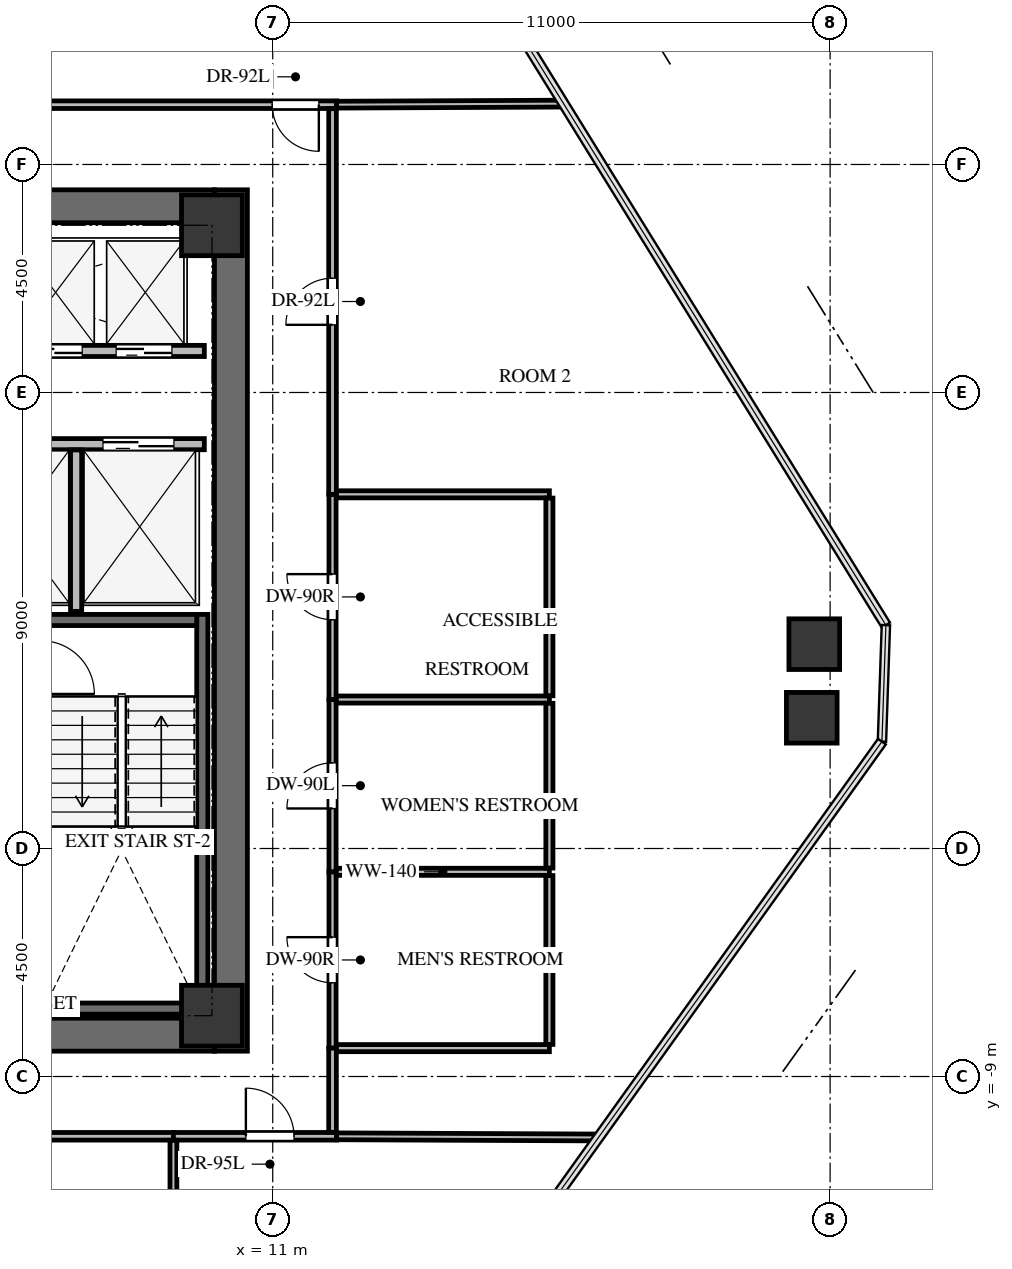
"""IFC4 building model, lengths in metres.
Left out: names, types, materials, properties, quantities, classifications, styles, units other than length and angle.
Written with IfcOpenShell. Run it as: python <this file> out.ifc"""

import sys

from ifc_helpers import new_model, si_unit, direction, frame, frame_2d, origin, origin_2d, place, context, subcontext, project, spatial, rectangle, extrude, source, transform, mapped, element, fill, save


model = new_model("IFC4")
c1 = context("Model", 3, precision=1e-05, world=origin(), true_north=direction((0.0, 1.0)))
c2 = subcontext(c1, "Body", "Model", "MODEL_VIEW")
j1 = project(units=[si_unit("LENGTHUNIT", "METRE"), si_unit("PLANEANGLEUNIT", "RADIAN")], contexts=[c1])
p1 = place(None, origin())
s1 = spatial("IfcSite", under=j1, at=p1, CompositionType="ELEMENT")
p2 = place(p1, origin())
s2 = spatial("IfcBuilding", under=s1, at=p2, CompositionType="ELEMENT")
p3 = place(p2, frame((0.0, 0.0, 193.6)))
s3 = spatial("IfcBuildingStorey", under=s2, at=p3, CompositionType="ELEMENT", Elevation=193.6)
p4 = place(p3, frame((10.175, -8.5, 0.0), z_axis=(0.0, 0.0, 1.0), x_axis=(0.0, 1.0, 0.0)))
e1 = element("IfcWall", 1, at=p4, inside=s3, PredefinedType="SHEAR", context=c2, shape_type="SweptSolid", body=[
    extrude(rectangle(XDim=17.0, YDim=0.65, at=frame_2d((8.5, 0.0))), origin(), (0.0, 0.0, 1.0), 3.3),
])
p5 = place(p3, frame((2.1, -8.175, 0.0), z_axis=(0.0, 0.0, 1.0), x_axis=(1.0, 0.0, 0.0)))
e2 = element("IfcWall", 2, at=p5, inside=s3, PredefinedType="SHEAR", context=c2, shape_type="SweptSolid", body=[
    extrude(rectangle(XDim=7.75, YDim=0.65, at=frame_2d((3.875, 0.0))), origin(), (0.0, 0.0, 1.0), 3.3),
])
p6 = place(p3, frame((-9.85, 8.175, 0.0), z_axis=(0.0, 0.0, 1.0), x_axis=(1.0, 0.0, 0.0)))
e3 = element("IfcWall", 3, at=p6, inside=s3, PredefinedType="SHEAR", context=c2, shape_type="SweptSolid", body=[
    extrude(rectangle(XDim=19.7, YDim=0.65, at=frame_2d((9.85, 0.0))), origin(), (0.0, 0.0, 1.0), 3.3),
])
p7 = place(p3, frame((9.61, -7.77, -0.24), z_axis=(0.0, 0.0, 1.0), x_axis=(0.0, 1.0, 0.0)))
e4 = element("IfcWall", 4, at=p7, inside=s3, PredefinedType="SHEAR", context=c2, shape_type="SweptSolid", body=[
    extrude(rectangle(XDim=7.89, YDim=0.22, at=frame_2d((3.945, 0.0))), origin(), (0.0, 0.0, 1.0), 3.3),
])
for number, where, z_axis, x_axis in (
    (5, (6.54, -7.66, -0.24), (0.0, 0.0, 1.0), (1.0, 0.0, 0.0)),
    (6, (9.5, 0.01, -0.24), (0.0, 0.0, 1.0), (-1.0, 0.0, 0.0)),
):
    element("IfcWall", number, at=place(p3, frame(where, z_axis=z_axis, x_axis=x_axis)), inside=s3, PredefinedType="SHEAR", context=c2, shape_type="SweptSolid", body=[
        extrude(rectangle(XDim=2.96, YDim=0.22, at=frame_2d((1.48, 0.0))), origin(), (0.0, 0.0, 1.0), 3.3),
    ])
m1 = source(origin(), c2, "Body", "SweptSolid", [
    extrude(rectangle(XDim=1.2, YDim=1.2, at=origin_2d()), origin(), (0.0, 0.0, 1.0), 3.3),
])
for number, where, z_axis, x_axis in (
    (7, (9.8, -7.8, -0.24), (0.0, 0.0, 1.0), (1.0, 0.0, 0.0)),
    (8, (9.8, 7.8, -0.24), (0.0, 0.0, 1.0), (1.0, 0.0, 0.0)),
):
    element("IfcColumn", number, at=place(p3, frame(where, z_axis=z_axis, x_axis=x_axis)), inside=s3, PredefinedType="COLUMN", context=c2, shape_type="MappedRepresentation", body=[
        mapped(m1, transform((0.0, 0.0, 0.0), x_axis=(1.0, 0.0, 0.0), y_axis=(0.0, 1.0, 0.0), z_axis=(0.0, 0.0, 1.0), scale=1.0)),
    ])
m2 = source(origin(), c2, "Body", "SweptSolid", [
    extrude(rectangle(XDim=1.0, YDim=1.0, at=origin_2d()), origin(), (0.0, 0.0, 1.0), 3.3),
])
for number, where, z_axis, x_axis in (
    (9, (21.687, -0.467, -0.24), (0.0, 0.0, 1.0), (1.0, 0.0, 0.0)),
    (10, (21.638, -1.92, -0.24), (0.0, 0.0, 1.0), (1.0, 0.0, 0.0)),
):
    element("IfcColumn", number, at=place(p3, frame(where, z_axis=z_axis, x_axis=x_axis)), inside=s3, PredefinedType="COLUMN", context=c2, shape_type="MappedRepresentation", body=[
        mapped(m2, transform((0.0, 0.0, 0.0), x_axis=(1.0, 0.0, 0.0), y_axis=(0.0, 1.0, 0.0), z_axis=(0.0, 0.0, 1.0), scale=1.0)),
    ])
p8 = place(p3, frame((4.6, 3.48, 0.0), z_axis=(0.0, 0.0, 1.0), x_axis=(1.0, 0.0, 0.0)))
e11 = element("IfcWall", 11, at=p8, inside=s3, PredefinedType="SOLIDWALL", context=c2, shape_type="SweptSolid", body=[
    extrude(rectangle(XDim=5.05, YDim=0.22, at=frame_2d((2.525, 0.0))), origin(), (0.0, 0.0, 1.0), 3.045),
])
p9 = place(p8, frame((0.55, 0.0, 0.0)))
e12 = element("IfcOpeningElement", 12, at=p9, cuts=e11, PredefinedType="OPENING", context=c2, shape_type="SweptSolid", body=[
    extrude(rectangle(XDim=1.4, YDim=2.15, at=frame_2d((0.7, 1.075))), frame((0.0, 0.12, 0.0), z_axis=(0.0, -1.0, 0.0), x_axis=(1.0, 0.0, 0.0)), (0.0, 0.0, 1.0), 0.24),
])
p10 = place(p8, frame((3.05, 0.0, 0.0)))
e13 = element("IfcOpeningElement", 13, at=p10, cuts=e11, PredefinedType="OPENING", context=c2, shape_type="SweptSolid", body=[
    extrude(rectangle(XDim=1.4, YDim=2.15, at=frame_2d((0.7, 1.075))), frame((0.0, 0.12, 0.0), z_axis=(0.0, -1.0, 0.0), x_axis=(1.0, 0.0, 0.0)), (0.0, 0.0, 1.0), 0.24),
])
p11 = place(p3, frame((7.12, 0.18, 0.0), z_axis=(0.0, 0.0, 1.0), x_axis=(0.0, 1.0, 0.0)))
e14 = element("IfcWall", 14, at=p11, inside=s3, PredefinedType="SOLIDWALL", context=c2, shape_type="SweptSolid", body=[
    extrude(rectangle(XDim=3.186, YDim=0.22, at=frame_2d((1.593, 0.0))), origin(), (0.0, 0.0, 1.0), 3.045),
])
p12 = place(p3, frame((2.325, 5.32, 0.0), z_axis=(0.0, 0.0, 1.0), x_axis=(1.0, 0.0, 0.0)))
e15 = element("IfcWall", 15, at=p12, inside=s3, PredefinedType="SOLIDWALL", context=c2, shape_type="SweptSolid", body=[
    extrude(rectangle(XDim=7.325, YDim=0.22, at=frame_2d((3.663, 0.0))), origin(), (0.0, 0.0, 1.0), 3.045),
])
p13 = place(p12, frame((0.275, 0.0, 0.0)))
e16 = element("IfcOpeningElement", 16, at=p13, cuts=e15, PredefinedType="OPENING", context=c2, shape_type="SweptSolid", body=[
    extrude(rectangle(XDim=1.1, YDim=2.15, at=frame_2d((0.55, 1.075))), frame((0.0, 0.12, 0.0), z_axis=(0.0, -1.0, 0.0), x_axis=(1.0, 0.0, 0.0)), (0.0, 0.0, 1.0), 0.24),
])
p14 = place(p12, frame((2.045, 0.0, 0.0)))
e17 = element("IfcOpeningElement", 17, at=p14, cuts=e15, PredefinedType="OPENING", context=c2, shape_type="SweptSolid", body=[
    extrude(rectangle(XDim=1.1, YDim=2.15, at=frame_2d((0.55, 1.075))), frame((0.0, 0.12, 0.0), z_axis=(0.0, -1.0, 0.0), x_axis=(1.0, 0.0, 0.0)), (0.0, 0.0, 1.0), 0.24),
])
p15 = place(p12, frame((3.815, 0.0, 0.0)))
e18 = element("IfcOpeningElement", 18, at=p15, cuts=e15, PredefinedType="OPENING", context=c2, shape_type="SweptSolid", body=[
    extrude(rectangle(XDim=1.1, YDim=2.15, at=frame_2d((0.55, 1.075))), frame((0.0, 0.12, 0.0), z_axis=(0.0, -1.0, 0.0), x_axis=(1.0, 0.0, 0.0)), (0.0, 0.0, 1.0), 0.24),
])
p16 = place(p12, frame((5.585, 0.0, 0.0)))
e19 = element("IfcOpeningElement", 19, at=p16, cuts=e15, PredefinedType="OPENING", context=c2, shape_type="SweptSolid", body=[
    extrude(rectangle(XDim=1.1, YDim=2.15, at=frame_2d((0.55, 1.075))), frame((0.0, 0.12, 0.0), z_axis=(0.0, -1.0, 0.0), x_axis=(1.0, 0.0, 0.0)), (0.0, 0.0, 1.0), 0.24),
])
p17 = place(p3, frame((12.18, -8.44, 0.0), z_axis=(0.0, 0.0, 1.0), x_axis=(0.0, 1.0, 0.0)))
e20 = element("IfcWall", 20, at=p17, inside=s3, PredefinedType="PARTITIONING", context=c2, shape_type="SweptSolid", body=[
    extrude(rectangle(XDim=3.48, YDim=0.14, at=frame_2d((1.74, 0.0))), origin(), (0.0, 0.0, 1.0), 3.045),
])
p18 = place(p17, frame((1.29, 0.0, 0.0)))
e21 = element("IfcOpeningElement", 21, at=p18, cuts=e20, PredefinedType="OPENING", context=c2, shape_type="SweptSolid", body=[
    extrude(rectangle(XDim=0.9, YDim=2.05, at=frame_2d((0.45, 1.025))), frame((0.0, 0.08, 0.0), z_axis=(0.0, -1.0, 0.0), x_axis=(1.0, 0.0, 0.0)), (0.0, 0.0, 1.0), 0.16),
])
p19 = place(p3, frame((12.18, -4.96, 0.0), z_axis=(0.0, 0.0, 1.0), x_axis=(0.0, 1.0, 0.0)))
e22 = element("IfcWall", 22, at=p19, inside=s3, PredefinedType="PARTITIONING", context=c2, shape_type="SweptSolid", body=[
    extrude(rectangle(XDim=3.4, YDim=0.14, at=frame_2d((1.7, 0.0))), origin(), (0.0, 0.0, 1.0), 3.045),
])
p20 = place(p19, frame((1.25, 0.0, 0.0)))
e23 = element("IfcOpeningElement", 23, at=p20, cuts=e22, PredefinedType="OPENING", context=c2, shape_type="SweptSolid", body=[
    extrude(rectangle(XDim=0.9, YDim=2.05, at=frame_2d((0.45, 1.025))), frame((0.0, 0.08, 0.0), z_axis=(0.0, -1.0, 0.0), x_axis=(1.0, 0.0, 0.0)), (0.0, 0.0, 1.0), 0.16),
])
p21 = place(p3, frame((12.18, -1.56, 0.0), z_axis=(0.0, 0.0, 1.0), x_axis=(0.0, 1.0, 0.0)))
e24 = element("IfcWall", 24, at=p21, inside=s3, PredefinedType="PARTITIONING", context=c2, shape_type="SweptSolid", body=[
    extrude(rectangle(XDim=4.05, YDim=0.14, at=frame_2d((2.025, 0.0))), origin(), (0.0, 0.0, 1.0), 2.242),
])
p22 = place(p21, frame((1.575, 0.0, 0.0)))
e25 = element("IfcOpeningElement", 25, at=p22, cuts=e24, PredefinedType="OPENING", context=c2, shape_type="SweptSolid", body=[
    extrude(rectangle(XDim=0.9, YDim=2.05, at=frame_2d((0.45, 1.025))), frame((0.0, 0.08, 0.0), z_axis=(0.0, -1.0, 0.0), x_axis=(1.0, 0.0, 0.0)), (0.0, 0.0, 1.0), 0.16),
])
p23 = place(p3, frame((12.26, 10.18, 0.0), z_axis=(0.0, 0.0, 1.0), x_axis=(-1.0, 0.0, 0.0)))
e26 = element("IfcWall", 26, at=p23, inside=s3, PredefinedType="PARTITIONING", context=c2, shape_type="SweptSolid", body=[
    extrude(rectangle(XDim=6.72, YDim=0.15, at=frame_2d((3.36, 0.0))), origin(), (0.0, 0.0, 1.0), 2.242),
])
p24 = place(p23, frame((0.35, 0.0, 0.0)))
e27 = element("IfcOpeningElement", 27, at=p24, cuts=e26, PredefinedType="OPENING", context=c2, shape_type="SweptSolid", body=[
    extrude(rectangle(XDim=0.92, YDim=2.1, at=frame_2d((0.46, 1.05))), frame((0.0, 0.085, 0.0), z_axis=(0.0, -1.0, 0.0), x_axis=(1.0, 0.0, 0.0)), (0.0, 0.0, 1.0), 0.17),
])
p25 = place(p3, frame((1.46, -10.18, 0.0), z_axis=(0.0, 0.0, 1.0), x_axis=(1.0, 0.0, 0.0)))
e28 = element("IfcWall", 28, at=p25, inside=s3, PredefinedType="PARTITIONING", context=c2, shape_type="SweptSolid", body=[
    extrude(rectangle(XDim=7.58, YDim=0.15, at=frame_2d((3.79, 0.0))), origin(), (0.0, 0.0, 1.0), 2.242),
])
p26 = place(p25, frame((3.33, 0.0, 0.0)))
e29 = element("IfcOpeningElement", 29, at=p26, cuts=e28, PredefinedType="OPENING", context=c2, shape_type="SweptSolid", body=[
    extrude(rectangle(XDim=0.92, YDim=2.1, at=frame_2d((0.46, 1.05))), frame((0.0, 0.085, 0.0), z_axis=(0.0, -1.0, 0.0), x_axis=(1.0, 0.0, 0.0)), (0.0, 0.0, 1.0), 0.17),
])
p27 = place(p3, frame((9.04, -10.18, 0.0), z_axis=(0.0, 0.0, 1.0), x_axis=(1.0, 0.0, 0.0)))
e30 = element("IfcWall", 30, at=p27, inside=s3, PredefinedType="PARTITIONING", context=c2, shape_type="SweptSolid", body=[
    extrude(rectangle(XDim=3.22, YDim=0.15, at=frame_2d((1.61, 0.0))), origin(), (0.0, 0.0, 1.0), 3.045),
])
p28 = place(p27, frame((1.43, 0.0, 0.0)))
e31 = element("IfcOpeningElement", 31, at=p28, cuts=e30, PredefinedType="OPENING", context=c2, shape_type="SweptSolid", body=[
    extrude(rectangle(XDim=0.95, YDim=2.1, at=frame_2d((0.475, 1.05))), frame((0.0, 0.085, 0.0), z_axis=(0.0, -1.0, 0.0), x_axis=(1.0, 0.0, 0.0)), (0.0, 0.0, 1.0), 0.17),
])
p29 = place(p3, frame((12.18, 2.49, 0.0), z_axis=(0.0, 0.0, 1.0), x_axis=(0.0, 1.0, 0.0)))
e32 = element("IfcWall", 32, at=p29, inside=s3, PredefinedType="PARTITIONING", context=c2, shape_type="SweptSolid", body=[
    extrude(rectangle(XDim=7.611, YDim=0.15, at=frame_2d((3.806, 0.0))), origin(), (0.0, 0.0, 1.0), 3.045),
])
p30 = place(p29, frame((3.345, 0.0, 0.0)))
e33 = element("IfcOpeningElement", 33, at=p30, cuts=e32, PredefinedType="OPENING", context=c2, shape_type="SweptSolid", body=[
    extrude(rectangle(XDim=0.92, YDim=2.1, at=frame_2d((0.46, 1.05))), frame((0.0, 0.085, 0.0), z_axis=(0.0, -1.0, 0.0), x_axis=(1.0, 0.0, 0.0)), (0.0, 0.0, 1.0), 0.17),
])
p31 = place(p3, frame((12.18, -10.101, 0.0), z_axis=(0.0, 0.0, 1.0), x_axis=(0.0, 1.0, 0.0)))
e34 = element("IfcWall", 34, at=p31, inside=s3, PredefinedType="PARTITIONING", context=c2, shape_type="SweptSolid", body=[
    extrude(rectangle(XDim=1.661, YDim=0.15, at=frame_2d((0.831, 0.0))), origin(), (0.0, 0.0, 1.0), 3.045),
])
p32 = place(p3, frame((12.254, -4.96, 0.0), z_axis=(0.0, 0.0, 1.0), x_axis=(1.0, 0.0, 0.0)))
e35 = element("IfcWall", 35, at=p32, inside=s3, PredefinedType="PARTITIONING", context=c2, shape_type="SweptSolid", body=[
    extrude(rectangle(XDim=4.206, YDim=0.14, at=frame_2d((2.103, 0.0))), origin(), (0.0, 0.0, 1.0), 3.045),
])
p33 = place(p3, frame((16.46, -8.44, 0.0), z_axis=(0.0, 0.0, 1.0), x_axis=(-1.0, 0.0, 0.0)))
e36 = element("IfcWall", 36, at=p33, inside=s3, PredefinedType="PARTITIONING", context=c2, shape_type="SweptSolid", body=[
    extrude(rectangle(XDim=4.201, YDim=0.14, at=frame_2d((2.101, 0.0))), origin(), (0.0, 0.0, 1.0), 3.045),
])
p34 = place(p3, frame((16.46, -5.034, 0.0), z_axis=(0.0, 0.0, 1.0), x_axis=(0.0, -1.0, 0.0)))
e37 = element("IfcWall", 37, at=p34, inside=s3, PredefinedType="PARTITIONING", context=c2, shape_type="SweptSolid", body=[
    extrude(rectangle(XDim=3.332, YDim=0.14, at=frame_2d((1.666, 0.0))), origin(), (0.0, 0.0, 1.0), 3.045),
])
p35 = place(p3, frame((12.254, -1.56, 0.0), z_axis=(0.0, 0.0, 1.0), x_axis=(1.0, 0.0, 0.0)))
e38 = element("IfcWall", 38, at=p35, inside=s3, PredefinedType="PARTITIONING", context=c2, shape_type="SweptSolid", body=[
    extrude(rectangle(XDim=4.206, YDim=0.14, at=frame_2d((2.103, 0.0))), origin(), (0.0, 0.0, 1.0), 3.045),
])
p36 = place(p3, frame((16.46, -1.634, 0.0), z_axis=(0.0, 0.0, 1.0), x_axis=(0.0, -1.0, 0.0)))
e39 = element("IfcWall", 39, at=p36, inside=s3, PredefinedType="PARTITIONING", context=c2, shape_type="SweptSolid", body=[
    extrude(rectangle(XDim=3.252, YDim=0.14, at=frame_2d((1.626, 0.0))), origin(), (0.0, 0.0, 1.0), 3.045),
])
p37 = place(p3, frame((12.259, 2.49, 0.0), z_axis=(0.0, 0.0, 1.0), x_axis=(1.0, 0.0, 0.0)))
e40 = element("IfcWall", 40, at=p37, inside=s3, PredefinedType="PARTITIONING", context=c2, shape_type="SweptSolid", body=[
    extrude(rectangle(XDim=4.201, YDim=0.14, at=frame_2d((2.101, 0.0))), origin(), (0.0, 0.0, 1.0), 3.045),
])
p38 = place(p3, frame((16.46, 2.416, 0.0), z_axis=(0.0, 0.0, 1.0), x_axis=(0.0, -1.0, 0.0)))
e41 = element("IfcWall", 41, at=p38, inside=s3, PredefinedType="PARTITIONING", context=c2, shape_type="SweptSolid", body=[
    extrude(rectangle(XDim=3.902, YDim=0.14, at=frame_2d((1.951, 0.0))), origin(), (0.0, 0.0, 1.0), 2.242),
])
p39 = place(p3, frame((16.74, 10.201, 0.0), z_axis=(0.0, 0.0, 1.0), x_axis=(-0.999989522694, -0.004577608714, 0.0)))
e42 = element("IfcWall", 42, at=p39, inside=s3, PredefinedType="PARTITIONING", context=c2, shape_type="SweptSolid", body=[
    extrude(rectangle(XDim=4.48, YDim=0.135, at=frame_2d((2.24, 0.0))), origin(), (0.0, 0.0, 1.0), 2.399),
])
p40 = place(p3, frame((9.04, -10.259, 0.0), z_axis=(0.0, 0.0, 1.0), x_axis=(0.0, -1.0, 0.0)))
e43 = element("IfcWall", 43, at=p40, inside=s3, PredefinedType="PARTITIONING", context=c2, shape_type="SweptSolid", body=[
    extrude(rectangle(XDim=3.67, YDim=0.135, at=frame_2d((1.835, 0.0))), origin(), (0.0, 0.0, 1.0), 2.242),
])
p41 = place(p3, frame((12.26, -10.18, 0.0), z_axis=(0.0, 0.0, 1.0), x_axis=(0.999990144117, -0.004439782427, 0.0)))
e44 = element("IfcWall", 44, at=p41, inside=s3, PredefinedType="PARTITIONING", context=c2, shape_type="SweptSolid", body=[
    extrude(rectangle(XDim=5.169, YDim=0.135, at=frame_2d((2.584, 0.0))), origin(), (0.0, 0.0, 1.0), 2.399),
])
m3 = source(origin(), c2, "Body", "SweptSolid", [
    extrude(rectangle(XDim=1.4, YDim=2.15, at=frame_2d((0.7, 1.075))), frame((0.0, 0.025, 0.0), z_axis=(0.0, -1.0, 0.0), x_axis=(1.0, 0.0, 0.0)), (0.0, 0.0, 1.0), 0.05),
])
p42 = place(p10, origin())
e45 = element("IfcDoor", 45, at=p42, inside=s3, OperationType="DOUBLE_DOOR_SLIDING", PredefinedType="DOOR", context=c2, shape_type="MappedRepresentation", body=[
    mapped(m3, transform((0.0, 0.0, 0.0), x_axis=(1.0, 0.0, 0.0), y_axis=(0.0, 1.0, 0.0), z_axis=(0.0, 0.0, 1.0), scale=1.0)),
])
fill(e13, e45)
m4 = source(origin(), c2, "Body", "SweptSolid", [
    extrude(rectangle(XDim=1.1, YDim=2.15, at=frame_2d((0.55, 1.075))), frame((0.0, 0.025, 0.0), z_axis=(0.0, -1.0, 0.0), x_axis=(1.0, 0.0, 0.0)), (0.0, 0.0, 1.0), 0.05),
])
p43 = place(p15, origin())
e46 = element("IfcDoor", 46, at=p43, inside=s3, OperationType="DOUBLE_DOOR_SLIDING", PredefinedType="DOOR", context=c2, shape_type="MappedRepresentation", body=[
    mapped(m4, transform((0.0, 0.0, 0.0), x_axis=(1.0, 0.0, 0.0), y_axis=(0.0, 1.0, 0.0), z_axis=(0.0, 0.0, 1.0), scale=1.0)),
])
fill(e18, e46)
p44 = place(p16, origin())
e47 = element("IfcDoor", 47, at=p44, inside=s3, OperationType="DOUBLE_DOOR_SLIDING", PredefinedType="DOOR", context=c2, shape_type="MappedRepresentation", body=[
    mapped(m4, transform((0.0, 0.0, 0.0), x_axis=(1.0, 0.0, 0.0), y_axis=(0.0, 1.0, 0.0), z_axis=(0.0, 0.0, 1.0), scale=1.0)),
])
fill(e19, e47)
m5 = source(origin(), c2, "Body", "SweptSolid", [
    extrude(rectangle(XDim=0.9, YDim=2.05, at=frame_2d((0.45, 1.025))), frame((0.0, 0.025, 0.0), z_axis=(0.0, -1.0, 0.0), x_axis=(1.0, 0.0, 0.0)), (0.0, 0.0, 1.0), 0.05),
])
p45 = place(p18, origin())
e48 = element("IfcDoor", 48, at=p45, inside=s3, OperationType="SINGLE_SWING_RIGHT", PredefinedType="DOOR", context=c2, shape_type="MappedRepresentation", body=[
    mapped(m5, transform((0.0, 0.0, 0.0), x_axis=(1.0, 0.0, 0.0), y_axis=(0.0, 1.0, 0.0), z_axis=(0.0, 0.0, 1.0), scale=1.0)),
])
fill(e21, e48)
m6 = source(origin(), c2, "Body", "SweptSolid", [
    extrude(rectangle(XDim=0.9, YDim=2.05, at=frame_2d((0.45, 1.025))), frame((0.0, 0.025, 0.0), z_axis=(0.0, -1.0, 0.0), x_axis=(1.0, 0.0, 0.0)), (0.0, 0.0, 1.0), 0.05),
])
p46 = place(p20, origin())
e49 = element("IfcDoor", 49, at=p46, inside=s3, OperationType="SINGLE_SWING_LEFT", PredefinedType="DOOR", context=c2, shape_type="MappedRepresentation", body=[
    mapped(m6, transform((0.0, 0.0, 0.0), x_axis=(1.0, 0.0, 0.0), y_axis=(0.0, 1.0, 0.0), z_axis=(0.0, 0.0, 1.0), scale=1.0)),
])
fill(e23, e49)
p47 = place(p22, origin())
e50 = element("IfcDoor", 50, at=p47, inside=s3, OperationType="SINGLE_SWING_RIGHT", PredefinedType="DOOR", context=c2, shape_type="MappedRepresentation", body=[
    mapped(m5, transform((0.0, 0.0, 0.0), x_axis=(1.0, 0.0, 0.0), y_axis=(0.0, 1.0, 0.0), z_axis=(0.0, 0.0, 1.0), scale=1.0)),
])
fill(e25, e50)
m7 = source(origin(), c2, "Body", "SweptSolid", [
    extrude(rectangle(XDim=0.92, YDim=2.1, at=frame_2d((0.46, 1.05))), frame((0.0, 0.025, 0.0), z_axis=(0.0, -1.0, 0.0), x_axis=(1.0, 0.0, 0.0)), (0.0, 0.0, 1.0), 0.05),
])
p48 = place(p24, origin())
e51 = element("IfcDoor", 51, at=p48, inside=s3, OperationType="SINGLE_SWING_LEFT", PredefinedType="DOOR", context=c2, shape_type="MappedRepresentation", body=[
    mapped(m7, transform((0.0, 0.0, 0.0), x_axis=(1.0, 0.0, 0.0), y_axis=(0.0, 1.0, 0.0), z_axis=(0.0, 0.0, 1.0), scale=1.0)),
])
fill(e27, e51)
m8 = source(origin(), c2, "Body", "SweptSolid", [
    extrude(rectangle(XDim=0.95, YDim=2.1, at=frame_2d((0.475, 1.05))), frame((0.0, 0.025, 0.0), z_axis=(0.0, -1.0, 0.0), x_axis=(1.0, 0.0, 0.0)), (0.0, 0.0, 1.0), 0.05),
])
p49 = place(p28, origin())
e52 = element("IfcDoor", 52, at=p49, inside=s3, OperationType="SINGLE_SWING_LEFT", PredefinedType="DOOR", context=c2, shape_type="MappedRepresentation", body=[
    mapped(m8, transform((0.0, 0.0, 0.0), x_axis=(1.0, 0.0, 0.0), y_axis=(0.0, 1.0, 0.0), z_axis=(0.0, 0.0, 1.0), scale=1.0)),
])
fill(e31, e52)
p50 = place(p30, origin())
e53 = element("IfcDoor", 53, at=p50, inside=s3, OperationType="SINGLE_SWING_LEFT", PredefinedType="DOOR", context=c2, shape_type="MappedRepresentation", body=[
    mapped(m7, transform((0.0, 0.0, 0.0), x_axis=(1.0, 0.0, 0.0), y_axis=(0.0, 1.0, 0.0), z_axis=(0.0, 0.0, 1.0), scale=1.0)),
])
fill(e33, e53)
save(model, sys.argv[1])
